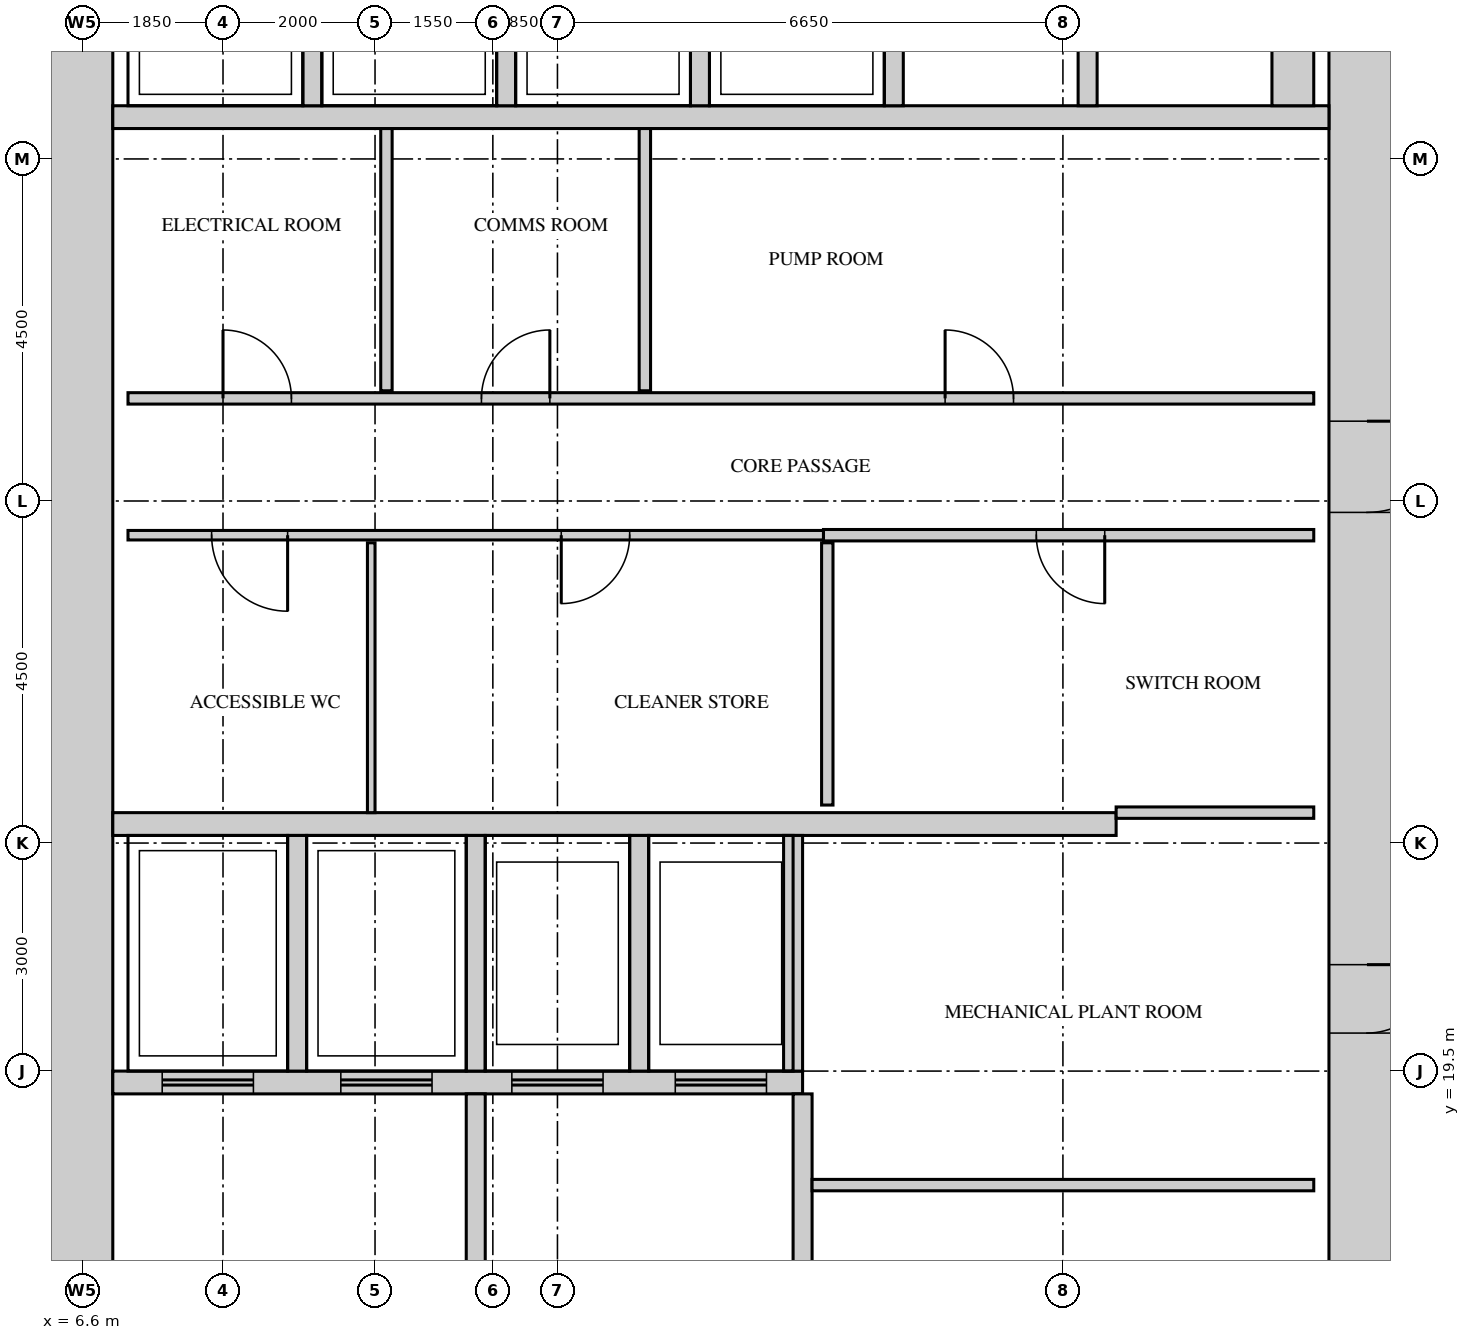
"""IFC4 building model, lengths in metres.
Left out: names, types, materials, properties, quantities, classifications, styles, units other than length and angle.
Written with IfcOpenShell. Run it as: python <this file> out.ifc"""

import sys

from ifc_helpers import new_model, si_unit, direction, frame, frame_2d, origin, place, context, subcontext, project, spatial, rectangle, extrude, source, transform, mapped, element, fill, save


model = new_model("IFC4")
c1 = context("Model", 3, precision=1e-05, world=origin(), true_north=direction((0.0, 1.0)))
c2 = subcontext(c1, "Body", "Model", "MODEL_VIEW")
j1 = project(units=[si_unit("LENGTHUNIT", "METRE"), si_unit("PLANEANGLEUNIT", "RADIAN")], contexts=[c1])
p1 = place(None, origin())
s1 = spatial("IfcSite", under=j1, at=p1, CompositionType="ELEMENT")
p2 = place(p1, origin())
s2 = spatial("IfcBuilding", under=s1, at=p2, CompositionType="ELEMENT")
p3 = place(p2, frame((0.0, 0.0, 114.7)))
s3 = spatial("IfcBuildingStorey", under=s2, at=p3, CompositionType="ELEMENT", Elevation=114.7)
m1 = source(origin(), c2, "Body", "SweptSolid", [
    extrude(rectangle(XDim=28.0, YDim=1.0, at=frame_2d((14.0, 0.0))), origin(), (0.0, 0.0, 1.0), 4.1),
])
p4 = place(p3, frame((23.5, 13.0, 0.0), z_axis=(0.0, 0.0, 1.0), x_axis=(0.0, 1.0, 0.0)))
e1 = element("IfcWall", 1, at=p4, inside=s3, PredefinedType="SHEAR", context=c2, shape_type="MappedRepresentation", body=[
    mapped(m1, transform((0.0, 0.0, 0.0))),
])
m2 = source(origin(), c2, "Body", "SweptSolid", [
    extrude(rectangle(XDim=1.8, YDim=2.1, at=frame_2d((0.9, 1.05))), frame((0.0, 0.51, 0.0), z_axis=(0.0, -1.0, 0.0), x_axis=(1.0, 0.0, 0.0)), (0.0, 0.0, 1.0), 1.02),
])
p5 = place(p4, frame((22.6, 0.0, 0.0)))
e2 = element("IfcOpeningElement", 2, at=p5, cuts=e1, PredefinedType="OPENING", context=c2, shape_type="MappedRepresentation", body=[
    mapped(m2, transform((0.0, 0.0, 0.0))),
])
m3 = source(origin(), c2, "Body", "SweptSolid", [
    extrude(rectangle(XDim=1.2, YDim=2.1, at=frame_2d((0.6, 1.05))), frame((0.0, 0.51, 0.0), z_axis=(0.0, -1.0, 0.0), x_axis=(1.0, 0.0, 0.0)), (0.0, 0.0, 1.0), 1.02),
])
p6 = place(p4, frame((13.85, 0.0, 0.0)))
e3 = element("IfcOpeningElement", 3, at=p6, cuts=e1, PredefinedType="OPENING", context=c2, shape_type="MappedRepresentation", body=[
    mapped(m3, transform((0.0, 0.0, 0.0))),
])
m4 = source(origin(), c2, "Body", "SweptSolid", [
    extrude(rectangle(XDim=0.9, YDim=2.1, at=frame_2d((0.45, 1.05))), frame((0.0, 0.51, 0.0), z_axis=(0.0, -1.0, 0.0), x_axis=(1.0, 0.0, 0.0)), (0.0, 0.0, 1.0), 1.02),
])
p7 = place(p4, frame((2.15, 0.0, 0.0)))
e4 = element("IfcOpeningElement", 4, at=p7, cuts=e1, PredefinedType="OPENING", context=c2, shape_type="MappedRepresentation", body=[
    mapped(m4, transform((0.0, 0.0, 0.0))),
])
p8 = place(p4, frame((7.0, 0.0, 0.0)))
e5 = element("IfcOpeningElement", 5, at=p8, cuts=e1, PredefinedType="OPENING", context=c2, shape_type="MappedRepresentation", body=[
    mapped(m4, transform((0.0, 0.0, 0.0))),
])
p9 = place(p3, frame((6.5, 13.0, 0.0), z_axis=(0.0, 0.0, 1.0), x_axis=(0.0, 1.0, 0.0)))
e6 = element("IfcWall", 6, at=p9, inside=s3, PredefinedType="SHEAR", context=c2, shape_type="MappedRepresentation", body=[
    mapped(m1, transform((0.0, 0.0, 0.0))),
])
m5 = source(origin(), c2, "Body", "SweptSolid", [
    extrude(rectangle(XDim=13.2, YDim=0.3, at=frame_2d((6.6, 0.0))), origin(), (0.0, 0.0, 1.0), 4.1),
])
p10 = place(p3, frame((7.0, 22.75, 0.0), z_axis=(0.0, 0.0, 1.0), x_axis=(1.0, 0.0, 0.0)))
e7 = element("IfcWall", 7, at=p10, inside=s3, PredefinedType="STANDARD", context=c2, shape_type="MappedRepresentation", body=[
    mapped(m5, transform((0.0, 0.0, 0.0))),
])
m6 = source(origin(), c2, "Body", "SweptSolid", [
    extrude(rectangle(XDim=9.075, YDim=0.3, at=frame_2d((4.538, 0.0))), origin(), (0.0, 0.0, 1.0), 4.1),
])
p11 = place(p3, frame((7.0, 19.35, 0.0), z_axis=(0.0, 0.0, 1.0), x_axis=(1.0, 0.0, 0.0)))
e8 = element("IfcWall", 8, at=p11, inside=s3, PredefinedType="STANDARD", context=c2, shape_type="MappedRepresentation", body=[
    mapped(m6, transform((0.0, 0.0, 0.0))),
])
m7 = source(origin(), c2, "Body", "SweptSolid", [
    extrude(rectangle(XDim=1.2, YDim=2.1, at=frame_2d((0.6, 1.05))), frame((0.0, 0.16, 0.0), z_axis=(0.0, -1.0, 0.0), x_axis=(1.0, 0.0, 0.0)), (0.0, 0.0, 1.0), 0.32),
])
p12 = place(p11, frame((0.65, 0.0, 0.0)))
e9 = element("IfcOpeningElement", 9, at=p12, cuts=e8, PredefinedType="OPENING", context=c2, shape_type="MappedRepresentation", body=[
    mapped(m7, transform((0.0, 0.0, 0.0))),
])
p13 = place(p11, frame((3.0, 0.0, 0.0)))
e10 = element("IfcOpeningElement", 10, at=p13, cuts=e8, PredefinedType="OPENING", context=c2, shape_type="MappedRepresentation", body=[
    mapped(m7, transform((0.0, 0.0, 0.0))),
])
p14 = place(p11, frame((5.25, 0.0, 0.0)))
e11 = element("IfcOpeningElement", 11, at=p14, cuts=e8, PredefinedType="OPENING", context=c2, shape_type="MappedRepresentation", body=[
    mapped(m7, transform((0.0, 0.0, 0.0))),
])
p15 = place(p11, frame((7.4, 0.0, 0.0)))
e12 = element("IfcOpeningElement", 12, at=p15, cuts=e8, PredefinedType="OPENING", context=c2, shape_type="MappedRepresentation", body=[
    mapped(m7, transform((0.0, 0.0, 0.0))),
])
m8 = source(origin(), c2, "Body", "SweptSolid", [
    extrude(rectangle(XDim=16.0, YDim=0.3, at=frame_2d((8.0, 0.0))), origin(), (0.0, 0.0, 1.0), 4.1),
])
p16 = place(p3, frame((7.0, 32.05, 0.0), z_axis=(0.0, 0.0, 1.0), x_axis=(1.0, 0.0, 0.0)))
e13 = element("IfcWall", 13, at=p16, inside=s3, PredefinedType="STANDARD", context=c2, shape_type="MappedRepresentation", body=[
    mapped(m8, transform((0.0, 0.0, 0.0))),
])
m9 = source(origin(), c2, "Body", "SweptSolid", [
    extrude(rectangle(XDim=3.1, YDim=0.25, at=frame_2d((1.55, 0.0))), origin(), (0.0, 0.0, 1.0), 4.1),
])
for number, where, z_axis, x_axis in (
    (14, (9.425, 19.5, 0.0), (0.0, 0.0, 1.0), (0.0, 1.0, 0.0)),
    (15, (11.775, 19.5, 0.0), (0.0, 0.0, 1.0), (0.0, 1.0, 0.0)),
    (16, (13.925, 19.5, 0.0), (0.0, 0.0, 1.0), (0.0, 1.0, 0.0)),
    (17, (15.95, 19.5, 0.0), (0.0, 0.0, 1.0), (0.0, 1.0, 0.0)),
):
    element("IfcWall", number, at=place(p3, frame(where, z_axis=z_axis, x_axis=x_axis)), inside=s3, PredefinedType="STANDARD", context=c2, shape_type="MappedRepresentation", body=[
        mapped(m9, transform((0.0, 0.0, 0.0))),
    ])
m10 = source(origin(), c2, "Body", "SweptSolid", [
    extrude(rectangle(XDim=2.4, YDim=0.25, at=frame_2d((1.2, 0.0))), origin(), (0.0, 0.0, 1.0), 4.1),
])
for number, where, z_axis, x_axis in (
    (18, (9.625, 32.2, 0.0), (0.0, 0.0, 1.0), (0.0, 1.0, 0.0)),
    (19, (12.175, 32.2, 0.0), (0.0, 0.0, 1.0), (0.0, 1.0, 0.0)),
    (20, (14.725, 32.2, 0.0), (0.0, 0.0, 1.0), (0.0, 1.0, 0.0)),
    (21, (17.275, 32.2, 0.0), (0.0, 0.0, 1.0), (0.0, 1.0, 0.0)),
    (22, (19.825, 32.2, 0.0), (0.0, 0.0, 1.0), (0.0, 1.0, 0.0)),
):
    element("IfcWall", number, at=place(p3, frame(where, z_axis=z_axis, x_axis=x_axis)), inside=s3, PredefinedType="STANDARD", context=c2, shape_type="MappedRepresentation", body=[
        mapped(m10, transform((0.0, 0.0, 0.0))),
    ])
m11 = source(origin(), c2, "Body", "SweptSolid", [
    extrude(rectangle(XDim=2.4, YDim=0.55, at=frame_2d((1.2, 0.0))), origin(), (0.0, 0.0, 1.0), 4.1),
])
p17 = place(p3, frame((22.525, 32.2, 0.0), z_axis=(0.0, 0.0, 1.0), x_axis=(0.0, 1.0, 0.0)))
e23 = element("IfcWall", 23, at=p17, inside=s3, PredefinedType="STANDARD", context=c2, shape_type="MappedRepresentation", body=[
    mapped(m11, transform((0.0, 0.0, 0.0))),
])
m12 = source(origin(), c2, "Body", "SweptSolid", [
    extrude(rectangle(XDim=3.4, YDim=0.25, at=frame_2d((1.7, 0.0))), origin(), (0.0, 0.0, 1.0), 4.1),
])
for number, where, z_axis, x_axis in (
    (24, (16.075, 15.8, 0.0), (0.0, 0.0, 1.0), (0.0, 1.0, 0.0)),
    (25, (11.775, 15.8, 0.0), (0.0, 0.0, 1.0), (0.0, 1.0, 0.0)),
):
    element("IfcWall", number, at=place(p3, frame(where, z_axis=z_axis, x_axis=x_axis)), inside=s3, PredefinedType="STANDARD", context=c2, shape_type="MappedRepresentation", body=[
        mapped(m12, transform((0.0, 0.0, 0.0))),
    ])
m13 = source(origin(), c2, "Body", "SweptSolid", [
    extrude(rectangle(XDim=6.6, YDim=0.15, at=frame_2d((3.3, 0.0))), origin(), (0.0, 0.0, 1.0), 4.2),
])
p18 = place(p3, frame((16.2, 18.0, 0.0), z_axis=(0.0, 0.0, 1.0), x_axis=(1.0, 0.0, 0.0)))
e26 = element("IfcWall", 26, at=p18, inside=s3, PredefinedType="PARTITIONING", context=c2, shape_type="MappedRepresentation", body=[
    mapped(m13, transform((0.0, 0.0, 0.0))),
])
m14 = source(origin(), c2, "Body", "SweptSolid", [
    extrude(rectangle(XDim=3.55, YDim=0.1, at=frame_2d((1.775, 0.0))), origin(), (0.0, 0.0, 1.0), 4.2),
])
p19 = place(p3, frame((10.4, 22.9, 0.0), z_axis=(0.0, 0.0, 1.0), x_axis=(0.0, 1.0, 0.0)))
e27 = element("IfcWall", 27, at=p19, inside=s3, PredefinedType="PARTITIONING", context=c2, shape_type="MappedRepresentation", body=[
    mapped(m14, transform((0.0, 0.0, 0.0))),
])
m15 = source(origin(), c2, "Body", "SweptSolid", [
    extrude(rectangle(XDim=2.6, YDim=0.15, at=frame_2d((1.3, 0.0))), origin(), (0.0, 0.0, 1.0), 4.2),
])
p20 = place(p3, frame((20.2, 22.9, 0.0), z_axis=(0.0, 0.0, 1.0), x_axis=(1.0, 0.0, 0.0)))
e28 = element("IfcWall", 28, at=p20, inside=s3, PredefinedType="PARTITIONING", context=c2, shape_type="MappedRepresentation", body=[
    mapped(m15, transform((0.0, 0.0, 0.0))),
])
m16 = source(origin(), c2, "Body", "SweptSolid", [
    extrude(rectangle(XDim=3.45, YDim=0.15, at=frame_2d((1.725, 0.0))), origin(), (0.0, 0.0, 1.0), 4.2),
])
p21 = place(p3, frame((16.4, 23.0, 0.0), z_axis=(0.0, 0.0, 1.0), x_axis=(0.0, 1.0, 0.0)))
e29 = element("IfcWall", 29, at=p21, inside=s3, PredefinedType="PARTITIONING", context=c2, shape_type="MappedRepresentation", body=[
    mapped(m16, transform((0.0, 0.0, 0.0))),
])
m17 = source(origin(), c2, "Body", "SweptSolid", [
    extrude(rectangle(XDim=9.15, YDim=0.125, at=frame_2d((4.575, 0.0))), origin(), (0.0, 0.0, 1.0), 4.2),
])
p22 = place(p3, frame((7.2, 26.55, 0.0), z_axis=(0.0, 0.0, 1.0), x_axis=(1.0, 0.0, 0.0)))
e30 = element("IfcWall", 30, at=p22, inside=s3, PredefinedType="PARTITIONING", context=c2, shape_type="MappedRepresentation", body=[
    mapped(m17, transform((0.0, 0.0, 0.0))),
])
m18 = source(origin(), c2, "Body", "SweptSolid", [
    extrude(rectangle(XDim=1.0, YDim=2.1, at=frame_2d((0.5, 1.05))), frame((0.0, 0.073, 0.0), z_axis=(0.0, -1.0, 0.0), x_axis=(1.0, 0.0, 0.0)), (0.0, 0.0, 1.0), 0.145),
])
p23 = place(p22, frame((1.1, 0.0, 0.0)))
e31 = element("IfcOpeningElement", 31, at=p23, cuts=e30, PredefinedType="OPENING", context=c2, shape_type="MappedRepresentation", body=[
    mapped(m18, transform((0.0, 0.0, 0.0))),
])
m19 = source(origin(), c2, "Body", "SweptSolid", [
    extrude(rectangle(XDim=0.9, YDim=2.1, at=frame_2d((0.45, 1.05))), frame((0.0, 0.073, 0.0), z_axis=(0.0, -1.0, 0.0), x_axis=(1.0, 0.0, 0.0)), (0.0, 0.0, 1.0), 0.145),
])
p24 = place(p22, frame((5.7, 0.0, 0.0)))
e32 = element("IfcOpeningElement", 32, at=p24, cuts=e30, PredefinedType="OPENING", context=c2, shape_type="MappedRepresentation", body=[
    mapped(m19, transform((0.0, 0.0, 0.0))),
])
m20 = source(origin(), c2, "Body", "SweptSolid", [
    extrude(rectangle(XDim=6.45, YDim=0.15, at=frame_2d((3.225, 0.0))), origin(), (0.0, 0.0, 1.0), 4.2),
])
p25 = place(p3, frame((16.35, 26.55, 0.0), z_axis=(0.0, 0.0, 1.0), x_axis=(1.0, 0.0, 0.0)))
e33 = element("IfcWall", 33, at=p25, inside=s3, PredefinedType="PARTITIONING", context=c2, shape_type="MappedRepresentation", body=[
    mapped(m20, transform((0.0, 0.0, 0.0))),
])
m21 = source(origin(), c2, "Body", "SweptSolid", [
    extrude(rectangle(XDim=0.9, YDim=2.1, at=frame_2d((0.45, 1.05))), frame((0.0, 0.085, 0.0), z_axis=(0.0, -1.0, 0.0), x_axis=(1.0, 0.0, 0.0)), (0.0, 0.0, 1.0), 0.17),
])
p26 = place(p25, frame((2.8, 0.0, 0.0)))
e34 = element("IfcOpeningElement", 34, at=p26, cuts=e33, PredefinedType="OPENING", context=c2, shape_type="MappedRepresentation", body=[
    mapped(m21, transform((0.0, 0.0, 0.0))),
])
m22 = source(origin(), c2, "Body", "SweptSolid", [
    extrude(rectangle(XDim=15.6, YDim=0.15, at=frame_2d((7.8, 0.0))), origin(), (0.0, 0.0, 1.0), 4.2),
])
p27 = place(p3, frame((7.2, 28.35, 0.0), z_axis=(0.0, 0.0, 1.0), x_axis=(1.0, 0.0, 0.0)))
e35 = element("IfcWall", 35, at=p27, inside=s3, PredefinedType="PARTITIONING", context=c2, shape_type="MappedRepresentation", body=[
    mapped(m22, transform((0.0, 0.0, 0.0))),
])
p28 = place(p27, frame((1.25, 0.0, 0.0)))
e36 = element("IfcOpeningElement", 36, at=p28, cuts=e35, PredefinedType="OPENING", context=c2, shape_type="MappedRepresentation", body=[
    mapped(m21, transform((0.0, 0.0, 0.0))),
])
p29 = place(p27, frame((4.65, 0.0, 0.0)))
e37 = element("IfcOpeningElement", 37, at=p29, cuts=e35, PredefinedType="OPENING", context=c2, shape_type="MappedRepresentation", body=[
    mapped(m21, transform((0.0, 0.0, 0.0))),
])
p30 = place(p27, frame((10.75, 0.0, 0.0)))
e38 = element("IfcOpeningElement", 38, at=p30, cuts=e35, PredefinedType="OPENING", context=c2, shape_type="MappedRepresentation", body=[
    mapped(m21, transform((0.0, 0.0, 0.0))),
])
for number, where, z_axis, x_axis in (
    (39, (10.6, 28.45, 0.0), (0.0, 0.0, 1.0), (0.0, 1.0, 0.0)),
    (40, (14.0, 28.45, 0.0), (0.0, 0.0, 1.0), (0.0, 1.0, 0.0)),
):
    element("IfcWall", number, at=place(p3, frame(where, z_axis=z_axis, x_axis=x_axis)), inside=s3, PredefinedType="PARTITIONING", context=c2, shape_type="MappedRepresentation", body=[
        mapped(m16, transform((0.0, 0.0, 0.0))),
    ])
m23 = source(origin(), c2, "Body", "SweptSolid", [
    extrude(rectangle(XDim=1.2, YDim=2.1, at=frame_2d((0.6, 1.05))), frame((0.0, 0.45, 0.0), z_axis=(0.0, -1.0, 0.0), x_axis=(1.0, 0.0, 0.0)), (0.0, 0.0, 1.0), 0.9),
])
p31 = place(p6, origin())
e41 = element("IfcDoor", 41, at=p31, inside=s3, OperationType="SINGLE_SWING_RIGHT", PredefinedType="DOOR", context=c2, shape_type="MappedRepresentation", body=[
    mapped(m23, transform((0.0, 0.0, 0.0))),
])
fill(e3, e41)
m24 = source(origin(), c2, "Body", "SweptSolid", [
    extrude(rectangle(XDim=0.9, YDim=2.1, at=frame_2d((0.45, 1.05))), frame((0.0, 0.025, 0.0), z_axis=(0.0, -1.0, 0.0), x_axis=(1.0, 0.0, 0.0)), (0.0, 0.0, 1.0), 0.05),
])
p32 = place(p28, origin())
e42 = element("IfcDoor", 42, at=p32, inside=s3, OperationType="SINGLE_SWING_RIGHT", PredefinedType="DOOR", context=c2, shape_type="MappedRepresentation", body=[
    mapped(m24, transform((0.0, 0.0, 0.0))),
])
fill(e36, e42)
p33 = place(p29, origin())
e43 = element("IfcDoor", 43, at=p33, inside=s3, OperationType="SINGLE_SWING_LEFT", PredefinedType="DOOR", context=c2, shape_type="MappedRepresentation", body=[
    mapped(m24, transform((0.0, 0.0, 0.0))),
])
fill(e37, e43)
p34 = place(p30, origin())
e44 = element("IfcDoor", 44, at=p34, inside=s3, OperationType="SINGLE_SWING_RIGHT", PredefinedType="DOOR", context=c2, shape_type="MappedRepresentation", body=[
    mapped(m24, transform((0.0, 0.0, 0.0))),
])
fill(e38, e44)
m25 = source(origin(), c2, "Body", "SweptSolid", [
    extrude(rectangle(XDim=1.0, YDim=2.1, at=frame_2d((0.5, 1.05))), frame((0.0, 0.025, 0.0), z_axis=(0.0, -1.0, 0.0), x_axis=(1.0, 0.0, 0.0)), (0.0, 0.0, 1.0), 0.05),
])
p35 = place(p23, origin())
e45 = element("IfcDoor", 45, at=p35, inside=s3, OperationType="SINGLE_SWING_RIGHT", PredefinedType="DOOR", context=c2, shape_type="MappedRepresentation", body=[
    mapped(m25, transform((0.0, 0.0, 0.0))),
])
fill(e31, e45)
p36 = place(p24, origin())
e46 = element("IfcDoor", 46, at=p36, inside=s3, OperationType="SINGLE_SWING_LEFT", PredefinedType="DOOR", context=c2, shape_type="MappedRepresentation", body=[
    mapped(m24, transform((0.0, 0.0, 0.0))),
])
fill(e32, e46)
p37 = place(p26, origin())
e47 = element("IfcDoor", 47, at=p37, inside=s3, OperationType="SINGLE_SWING_RIGHT", PredefinedType="DOOR", context=c2, shape_type="MappedRepresentation", body=[
    mapped(m24, transform((0.0, 0.0, 0.0))),
])
fill(e34, e47)
m26 = source(origin(), c2, "Body", "SweptSolid", [
    extrude(rectangle(XDim=0.9, YDim=2.1, at=frame_2d((0.45, 1.05))), frame((0.0, 0.45, 0.0), z_axis=(0.0, -1.0, 0.0), x_axis=(1.0, 0.0, 0.0)), (0.0, 0.0, 1.0), 0.9),
])
p38 = place(p8, origin())
e48 = element("IfcDoor", 48, at=p38, inside=s3, OperationType="SINGLE_SWING_RIGHT", PredefinedType="DOOR", context=c2, shape_type="MappedRepresentation", body=[
    mapped(m26, transform((0.0, 0.0, 0.0))),
])
fill(e5, e48)
m27 = source(origin(), c2, "Body", "SweptSolid", [
    extrude(rectangle(XDim=1.2, YDim=2.1, at=frame_2d((0.6, 1.05))), frame((0.0, 0.025, 0.0), z_axis=(0.0, -1.0, 0.0), x_axis=(1.0, 0.0, 0.0)), (0.0, 0.0, 1.0), 0.05),
])
p39 = place(p12, origin())
e49 = element("IfcDoor", 49, at=p39, inside=s3, OperationType="DOUBLE_DOOR_SLIDING", PredefinedType="DOOR", context=c2, shape_type="MappedRepresentation", body=[
    mapped(m27, transform((0.0, 0.0, 0.0))),
])
fill(e9, e49)
p40 = place(p13, origin())
e50 = element("IfcDoor", 50, at=p40, inside=s3, OperationType="DOUBLE_DOOR_SLIDING", PredefinedType="DOOR", context=c2, shape_type="MappedRepresentation", body=[
    mapped(m27, transform((0.0, 0.0, 0.0))),
])
fill(e10, e50)
p41 = place(p14, origin())
e51 = element("IfcDoor", 51, at=p41, inside=s3, OperationType="DOUBLE_DOOR_SLIDING", PredefinedType="DOOR", context=c2, shape_type="MappedRepresentation", body=[
    mapped(m27, transform((0.0, 0.0, 0.0))),
])
fill(e11, e51)
p42 = place(p15, origin())
e52 = element("IfcDoor", 52, at=p42, inside=s3, OperationType="DOUBLE_DOOR_SLIDING", PredefinedType="DOOR", context=c2, shape_type="MappedRepresentation", body=[
    mapped(m27, transform((0.0, 0.0, 0.0))),
])
fill(e12, e52)
save(model, sys.argv[1])
